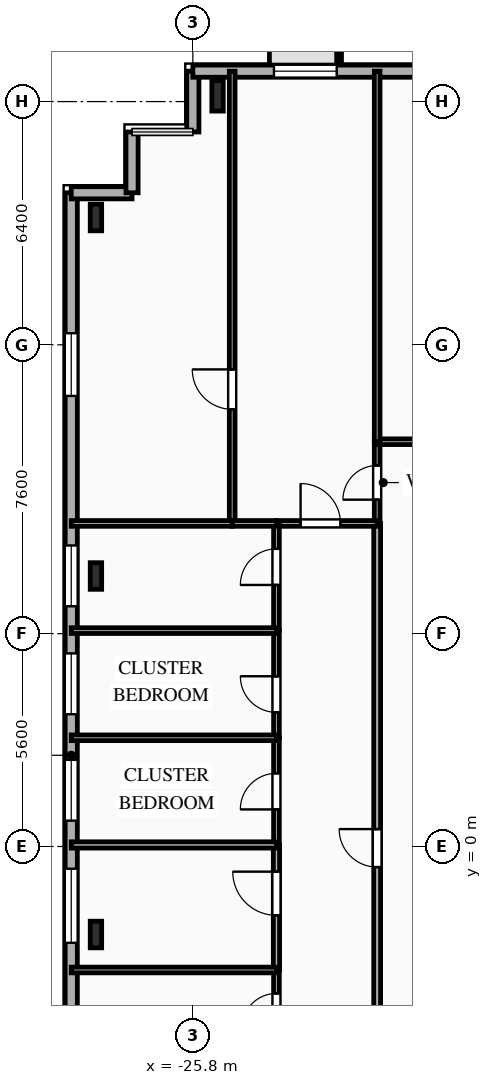
"""IFC4 building model, lengths in metres.
Left out: names, types, materials, properties, quantities, classifications, styles, units other than length and angle.
Written with IfcOpenShell. Run it as: python <this file> out.ifc"""

import sys

from ifc_helpers import new_model, si_unit, direction, frame, frame_2d, origin, origin_2d, place, context, subcontext, project, spatial, rectangle, i_section, extrude, element, fill, save


model = new_model("IFC4")
c1 = context("Model", 3, precision=1e-05, world=origin(), true_north=direction((0.0, 1.0)))
c2 = subcontext(c1, "Body", "Model", "MODEL_VIEW")
j1 = project(units=[si_unit("LENGTHUNIT", "METRE"), si_unit("PLANEANGLEUNIT", "RADIAN")], contexts=[c1])
p1 = place(None, origin())
s1 = spatial("IfcSite", under=j1, at=p1, CompositionType="ELEMENT")
p2 = place(p1, origin())
s2 = spatial("IfcBuilding", under=s1, at=p2, CompositionType="ELEMENT")
p3 = place(p2, frame((0.0, 0.0, 134.35)))
s3 = spatial("IfcBuildingStorey", under=s2, at=p3, CompositionType="ELEMENT", Elevation=134.35)
p4 = place(p3, frame((-25.15, 19.75, 0.0), z_axis=(0.0, 0.0, 1.0), x_axis=(1.0, 0.0, 0.0)))
e1 = element("IfcColumn", 1, at=p4, inside=s3, PredefinedType="COLUMN", context=c2, shape_type="SweptSolid", body=[
    extrude(i_section(OverallWidth=0.3, OverallDepth=0.8, WebThickness=0.018, FlangeThickness=0.033, FilletRadius=0.03, at=origin_2d()), origin(), (0.0, 0.0, 1.0), 3.35),
])
for number, where, z_axis, x_axis in (
    (2, (-28.35, 16.55, 0.0), (0.0, 0.0, 1.0), (1.0, 0.0, 0.0)),
    (3, (-28.35, 7.117, 0.0), (0.0, 0.0, 1.0), (1.0, 0.0, 0.0)),
    (4, (-28.35, -2.317, 0.0), (0.0, 0.0, 1.0), (1.0, 0.0, 0.0)),
):
    element("IfcColumn", number, at=place(p3, frame(where, z_axis=z_axis, x_axis=x_axis)), inside=s3, PredefinedType="COLUMN", context=c2, shape_type="SweptSolid", body=[
        extrude(i_section(OverallWidth=0.3, OverallDepth=0.7, WebThickness=0.017, FlangeThickness=0.032, FilletRadius=0.027, at=origin_2d()), origin(), (0.0, 0.0, 1.0), 3.35),
    ])
p5 = place(p3, frame((-29.0, -12.4, 0.0), z_axis=(0.0, 0.0, 1.0), x_axis=(0.0, 1.0, 0.0)))
e5 = element("IfcWall", 5, at=p5, inside=s3, PredefinedType="SOLIDWALL", context=c2, shape_type="SweptSolid", body=[
    extrude(rectangle(XDim=29.6, YDim=0.32, at=frame_2d((14.8, 0.0))), origin(), (0.0, 0.0, 1.0), 3.04),
])
p6 = place(p5, frame((2.855, 0.0, 0.85)))
e6 = element("IfcOpeningElement", 6, at=p6, cuts=e5, PredefinedType="OPENING", context=c2, shape_type="SweptSolid", body=[
    extrude(rectangle(XDim=1.65, YDim=1.85, at=frame_2d((0.825, 0.925))), frame((0.0, 0.17, 0.0), z_axis=(0.0, -1.0, 0.0), x_axis=(1.0, 0.0, 0.0)), (0.0, 0.0, 1.0), 0.34),
])
p7 = place(p5, frame((9.865, 0.0, 0.85)))
e7 = element("IfcOpeningElement", 7, at=p7, cuts=e5, PredefinedType="OPENING", context=c2, shape_type="SweptSolid", body=[
    extrude(rectangle(XDim=1.95, YDim=1.85, at=frame_2d((0.975, 0.925))), frame((0.0, 0.17, 0.0), z_axis=(0.0, -1.0, 0.0), x_axis=(1.0, 0.0, 0.0)), (0.0, 0.0, 1.0), 0.34),
])
p8 = place(p5, frame((13.08, 0.0, 0.85)))
e8 = element("IfcOpeningElement", 8, at=p8, cuts=e5, PredefinedType="OPENING", context=c2, shape_type="SweptSolid", body=[
    extrude(rectangle(XDim=1.6, YDim=1.85, at=frame_2d((0.8, 0.925))), frame((0.0, 0.17, 0.0), z_axis=(0.0, -1.0, 0.0), x_axis=(1.0, 0.0, 0.0)), (0.0, 0.0, 1.0), 0.34),
])
p9 = place(p5, frame((15.88, 0.0, 0.85)))
e9 = element("IfcOpeningElement", 9, at=p9, cuts=e5, PredefinedType="OPENING", context=c2, shape_type="SweptSolid", body=[
    extrude(rectangle(XDim=1.6, YDim=1.85, at=frame_2d((0.8, 0.925))), frame((0.0, 0.17, 0.0), z_axis=(0.0, -1.0, 0.0), x_axis=(1.0, 0.0, 0.0)), (0.0, 0.0, 1.0), 0.34),
])
p10 = place(p5, frame((18.72, 0.0, 0.85)))
e10 = element("IfcOpeningElement", 10, at=p10, cuts=e5, PredefinedType="OPENING", context=c2, shape_type="SweptSolid", body=[
    extrude(rectangle(XDim=1.6, YDim=1.85, at=frame_2d((0.8, 0.925))), frame((0.0, 0.17, 0.0), z_axis=(0.0, -1.0, 0.0), x_axis=(1.0, 0.0, 0.0)), (0.0, 0.0, 1.0), 0.34),
])
p11 = place(p5, frame((24.255, 0.0, 0.85)))
e11 = element("IfcOpeningElement", 11, at=p11, cuts=e5, PredefinedType="OPENING", context=c2, shape_type="SweptSolid", body=[
    extrude(rectangle(XDim=1.65, YDim=1.85, at=frame_2d((0.825, 0.925))), frame((0.0, 0.17, 0.0), z_axis=(0.0, -1.0, 0.0), x_axis=(1.0, 0.0, 0.0)), (0.0, 0.0, 1.0), 0.34),
])
for number, where, z_axis, x_axis in (
    (12, (-29.0, 17.2, 0.0), (0.0, 0.0, 1.0), (1.0, 0.0, 0.0)),
    (13, (-27.4, 17.2, 0.0), (0.0, 0.0, 1.0), (0.0, 1.0, 0.0)),
):
    element("IfcWall", number, at=place(p3, frame(where, z_axis=z_axis, x_axis=x_axis)), inside=s3, PredefinedType="SOLIDWALL", context=c2, shape_type="SweptSolid", body=[
        extrude(rectangle(XDim=1.6, YDim=0.32, at=frame_2d((0.8, 0.0))), origin(), (0.0, 0.0, 1.0), 3.04),
    ])
p12 = place(p3, frame((-25.8, 18.8, 0.0), z_axis=(0.0, 0.0, 1.0), x_axis=(0.0, 1.0, 0.0)))
e14 = element("IfcWall", 14, at=p12, inside=s3, PredefinedType="SOLIDWALL", context=c2, shape_type="SweptSolid", body=[
    extrude(rectangle(XDim=1.6, YDim=0.32, at=frame_2d((0.8, 0.0))), origin(), (0.0, 0.0, 1.0), 3.04),
])
p13 = place(p3, frame((-25.8, 20.4, 0.0), z_axis=(0.0, 0.0, 1.0), x_axis=(1.0, 0.0, 0.0)))
e15 = element("IfcWall", 15, at=p13, inside=s3, PredefinedType="SOLIDWALL", context=c2, shape_type="SweptSolid", body=[
    extrude(rectangle(XDim=49.6, YDim=0.32, at=frame_2d((24.8, 0.0))), origin(), (0.0, 0.0, 1.0), 3.04),
])
p14 = place(p13, frame((2.135, 0.0, 0.85)))
e16 = element("IfcOpeningElement", 16, at=p14, cuts=e15, PredefinedType="OPENING", context=c2, shape_type="SweptSolid", body=[
    extrude(rectangle(XDim=1.65, YDim=1.85, at=frame_2d((0.825, 0.925))), frame((0.0, 0.17, 0.0), z_axis=(0.0, -1.0, 0.0), x_axis=(1.0, 0.0, 0.0)), (0.0, 0.0, 1.0), 0.34),
])
p15 = place(p13, frame((6.706, 0.0, 0.85)))
e17 = element("IfcOpeningElement", 17, at=p15, cuts=e15, PredefinedType="OPENING", context=c2, shape_type="SweptSolid", body=[
    extrude(rectangle(XDim=1.65, YDim=1.85, at=frame_2d((0.825, 0.925))), frame((0.0, 0.17, 0.0), z_axis=(0.0, -1.0, 0.0), x_axis=(1.0, 0.0, 0.0)), (0.0, 0.0, 1.0), 0.34),
])
p16 = place(p13, frame((14.76, 0.0, 0.85)))
e18 = element("IfcOpeningElement", 18, at=p16, cuts=e15, PredefinedType="OPENING", context=c2, shape_type="SweptSolid", body=[
    extrude(rectangle(XDim=1.6, YDim=1.85, at=frame_2d((0.8, 0.925))), frame((0.0, 0.17, 0.0), z_axis=(0.0, -1.0, 0.0), x_axis=(1.0, 0.0, 0.0)), (0.0, 0.0, 1.0), 0.34),
])
p17 = place(p13, frame((19.26, 0.0, 0.85)))
e19 = element("IfcOpeningElement", 19, at=p17, cuts=e15, PredefinedType="OPENING", context=c2, shape_type="SweptSolid", body=[
    extrude(rectangle(XDim=2.2, YDim=1.85, at=frame_2d((1.1, 0.925))), frame((0.0, 0.17, 0.0), z_axis=(0.0, -1.0, 0.0), x_axis=(1.0, 0.0, 0.0)), (0.0, 0.0, 1.0), 0.34),
])
p18 = place(p13, frame((25.26, 0.0, 0.85)))
e20 = element("IfcOpeningElement", 20, at=p18, cuts=e15, PredefinedType="OPENING", context=c2, shape_type="SweptSolid", body=[
    extrude(rectangle(XDim=2.2, YDim=1.85, at=frame_2d((1.1, 0.925))), frame((0.0, 0.17, 0.0), z_axis=(0.0, -1.0, 0.0), x_axis=(1.0, 0.0, 0.0)), (0.0, 0.0, 1.0), 0.34),
])
p19 = place(p13, frame((30.4, 0.0, 0.85)))
e21 = element("IfcOpeningElement", 21, at=p19, cuts=e15, PredefinedType="OPENING", context=c2, shape_type="SweptSolid", body=[
    extrude(rectangle(XDim=2.2, YDim=1.85, at=frame_2d((1.1, 0.925))), frame((0.0, 0.17, 0.0), z_axis=(0.0, -1.0, 0.0), x_axis=(1.0, 0.0, 0.0)), (0.0, 0.0, 1.0), 0.34),
])
p20 = place(p13, frame((37.18, 0.0, 0.85)))
e22 = element("IfcOpeningElement", 22, at=p20, cuts=e15, PredefinedType="OPENING", context=c2, shape_type="SweptSolid", body=[
    extrude(rectangle(XDim=2.2, YDim=1.85, at=frame_2d((1.1, 0.925))), frame((0.0, 0.17, 0.0), z_axis=(0.0, -1.0, 0.0), x_axis=(1.0, 0.0, 0.0)), (0.0, 0.0, 1.0), 0.34),
])
p21 = place(p13, frame((43.215, 0.0, 0.85)))
e23 = element("IfcOpeningElement", 23, at=p21, cuts=e15, PredefinedType="OPENING", context=c2, shape_type="SweptSolid", body=[
    extrude(rectangle(XDim=1.65, YDim=1.85, at=frame_2d((0.825, 0.925))), frame((0.0, 0.17, 0.0), z_axis=(0.0, -1.0, 0.0), x_axis=(1.0, 0.0, 0.0)), (0.0, 0.0, 1.0), 0.34),
])
p22 = place(p13, frame((47.45, 0.0, 0.85)))
e24 = element("IfcOpeningElement", 24, at=p22, cuts=e15, PredefinedType="OPENING", context=c2, shape_type="SweptSolid", body=[
    extrude(rectangle(XDim=1.1, YDim=1.85, at=frame_2d((0.55, 0.925))), frame((0.0, 0.17, 0.0), z_axis=(0.0, -1.0, 0.0), x_axis=(1.0, 0.0, 0.0)), (0.0, 0.0, 1.0), 0.34),
])
p23 = place(p3, frame((-20.95, 8.5, 0.0), z_axis=(0.0, 0.0, 1.0), x_axis=(0.0, 1.0, 0.0)))
e25 = element("IfcWall", 25, at=p23, inside=s3, PredefinedType="PARTITIONING", context=c2, shape_type="SweptSolid", body=[
    extrude(rectangle(XDim=2.15, YDim=0.15, at=frame_2d((1.075, 0.0))), origin(), (0.0, 0.0, 1.0), 3.04),
])
p24 = place(p23, frame((0.625, 0.0, 0.0)))
e26 = element("IfcOpeningElement", 26, at=p24, cuts=e25, PredefinedType="OPENING", context=c2, shape_type="SweptSolid", body=[
    extrude(rectangle(XDim=0.9, YDim=2.1, at=frame_2d((0.45, 1.05))), frame((0.0, 0.085, 0.0), z_axis=(0.0, -1.0, 0.0), x_axis=(1.0, 0.0, 0.0)), (0.0, 0.0, 1.0), 0.17),
])
p25 = place(p3, frame((-20.95, 10.65, 0.0), z_axis=(0.0, 0.0, 1.0), x_axis=(1.0, 0.0, 0.0)))
e27 = element("IfcWall", 27, at=p25, inside=s3, PredefinedType="PARTITIONING", context=c2, shape_type="SweptSolid", body=[
    extrude(rectangle(XDim=6.486, YDim=0.15, at=frame_2d((3.243, 0.0))), origin(), (0.0, 0.0, 1.0), 3.04),
])
p26 = place(p25, frame((4.322, 0.0, 0.0)))
e28 = element("IfcOpeningElement", 28, at=p26, cuts=e27, PredefinedType="OPENING", context=c2, shape_type="SweptSolid", body=[
    extrude(rectangle(XDim=1.05, YDim=2.15, at=frame_2d((0.525, 1.075))), frame((0.0, 0.085, 0.0), z_axis=(0.0, -1.0, 0.0), x_axis=(1.0, 0.0, 0.0)), (0.0, 0.0, 1.0), 0.17),
])
p27 = place(p3, frame((-20.95, -5.6, 0.0), z_axis=(0.0, 0.0, 1.0), x_axis=(0.0, 1.0, 0.0)))
e29 = element("IfcWall", 29, at=p27, inside=s3, PredefinedType="PARTITIONING", context=c2, shape_type="SweptSolid", body=[
    extrude(rectangle(XDim=14.1, YDim=0.18, at=frame_2d((7.05, 0.0))), origin(), (0.0, 0.0, 1.0), 3.04),
])
p28 = place(p27, frame((5.058, 0.0, 0.0)))
e30 = element("IfcOpeningElement", 30, at=p28, cuts=e29, PredefinedType="OPENING", context=c2, shape_type="SweptSolid", body=[
    extrude(rectangle(XDim=1.0, YDim=2.15, at=frame_2d((0.5, 1.075))), frame((0.0, 0.1, 0.0), z_axis=(0.0, -1.0, 0.0), x_axis=(1.0, 0.0, 0.0)), (0.0, 0.0, 1.0), 0.2),
])
p29 = place(p3, frame((-23.6, 8.5, 0.0), z_axis=(0.0, 0.0, 1.0), x_axis=(1.0, 0.0, 0.0)))
e31 = element("IfcWall", 31, at=p29, inside=s3, PredefinedType="PARTITIONING", context=c2, shape_type="SweptSolid", body=[
    extrude(rectangle(XDim=2.65, YDim=0.15, at=frame_2d((1.325, 0.0))), origin(), (0.0, 0.0, 1.0), 3.04),
])
p30 = place(p29, frame((0.635, 0.0, 0.0)))
e32 = element("IfcOpeningElement", 32, at=p30, cuts=e31, PredefinedType="OPENING", context=c2, shape_type="SweptSolid", body=[
    extrude(rectangle(XDim=1.05, YDim=2.15, at=frame_2d((0.525, 1.075))), frame((0.0, 0.085, 0.0), z_axis=(0.0, -1.0, 0.0), x_axis=(1.0, 0.0, 0.0)), (0.0, 0.0, 1.0), 0.17),
])
p31 = place(p3, frame((-23.6, -5.6, 0.0), z_axis=(0.0, 0.0, 1.0), x_axis=(0.0, 1.0, 0.0)))
e33 = element("IfcWall", 33, at=p31, inside=s3, PredefinedType="PLUMBINGWALL", context=c2, shape_type="SweptSolid", body=[
    extrude(rectangle(XDim=2.35, YDim=0.15, at=frame_2d((1.175, 0.0))), origin(), (0.0, 0.0, 1.0), 2.695),
])
p32 = place(p31, frame((0.834, 0.0, 0.0)))
e34 = element("IfcOpeningElement", 34, at=p32, cuts=e33, PredefinedType="OPENING", context=c2, shape_type="SweptSolid", body=[
    extrude(rectangle(XDim=0.9, YDim=2.1, at=frame_2d((0.45, 1.05))), frame((0.0, 0.085, 0.0), z_axis=(0.0, -1.0, 0.0), x_axis=(1.0, 0.0, 0.0)), (0.0, 0.0, 1.0), 0.17),
])
p33 = place(p3, frame((-23.6, -3.25, 0.0), z_axis=(0.0, 0.0, 1.0), x_axis=(0.0, 1.0, 0.0)))
e35 = element("IfcWall", 35, at=p33, inside=s3, PredefinedType="PARTITIONING", context=c2, shape_type="SweptSolid", body=[
    extrude(rectangle(XDim=3.29, YDim=0.165, at=frame_2d((1.645, 0.0))), origin(), (0.0, 0.0, 1.0), 2.695),
])
p34 = place(p33, frame((1.438, 0.0, 0.0)))
e36 = element("IfcOpeningElement", 36, at=p34, cuts=e35, PredefinedType="OPENING", context=c2, shape_type="SweptSolid", body=[
    extrude(rectangle(XDim=1.15, YDim=2.15, at=frame_2d((0.575, 1.075))), frame((0.0, 0.093, 0.0), z_axis=(0.0, -1.0, 0.0), x_axis=(1.0, 0.0, 0.0)), (0.0, 0.0, 1.0), 0.185),
])
p35 = place(p3, frame((-23.6, 0.04, 0.0), z_axis=(0.0, 0.0, 1.0), x_axis=(0.0, 1.0, 0.0)))
e37 = element("IfcWall", 37, at=p35, inside=s3, PredefinedType="PARTITIONING", context=c2, shape_type="SweptSolid", body=[
    extrude(rectangle(XDim=2.82, YDim=0.15, at=frame_2d((1.41, 0.0))), origin(), (0.0, 0.0, 1.0), 2.695),
])
p36 = place(p35, frame((0.935, 0.0, 0.0)))
e38 = element("IfcOpeningElement", 38, at=p36, cuts=e37, PredefinedType="OPENING", context=c2, shape_type="SweptSolid", body=[
    extrude(rectangle(XDim=0.95, YDim=2.1, at=frame_2d((0.475, 1.05))), frame((0.0, 0.085, 0.0), z_axis=(0.0, -1.0, 0.0), x_axis=(1.0, 0.0, 0.0)), (0.0, 0.0, 1.0), 0.17),
])
p37 = place(p3, frame((-23.6, 2.86, 0.0), z_axis=(0.0, 0.0, 1.0), x_axis=(0.0, 1.0, 0.0)))
e39 = element("IfcWall", 39, at=p37, inside=s3, PredefinedType="PARTITIONING", context=c2, shape_type="SweptSolid", body=[
    extrude(rectangle(XDim=2.82, YDim=0.15, at=frame_2d((1.41, 0.0))), origin(), (0.0, 0.0, 1.0), 2.695),
])
p38 = place(p37, frame((0.669, 0.0, 0.0)))
e40 = element("IfcOpeningElement", 40, at=p38, cuts=e39, PredefinedType="OPENING", context=c2, shape_type="SweptSolid", body=[
    extrude(rectangle(XDim=0.95, YDim=2.1, at=frame_2d((0.475, 1.05))), frame((0.0, 0.085, 0.0), z_axis=(0.0, -1.0, 0.0), x_axis=(1.0, 0.0, 0.0)), (0.0, 0.0, 1.0), 0.17),
])
p39 = place(p3, frame((-23.6, 5.68, 0.0), z_axis=(0.0, 0.0, 1.0), x_axis=(0.0, 1.0, 0.0)))
e41 = element("IfcWall", 41, at=p39, inside=s3, PredefinedType="PARTITIONING", context=c2, shape_type="SweptSolid", body=[
    extrude(rectangle(XDim=2.82, YDim=0.15, at=frame_2d((1.41, 0.0))), origin(), (0.0, 0.0, 1.0), 2.695),
])
p40 = place(p39, frame((1.201, 0.0, 0.0)))
e42 = element("IfcOpeningElement", 42, at=p40, cuts=e41, PredefinedType="OPENING", context=c2, shape_type="SweptSolid", body=[
    extrude(rectangle(XDim=0.95, YDim=2.1, at=frame_2d((0.475, 1.05))), frame((0.0, 0.085, 0.0), z_axis=(0.0, -1.0, 0.0), x_axis=(1.0, 0.0, 0.0)), (0.0, 0.0, 1.0), 0.17),
])
p41 = place(p3, frame((-24.765, 8.5, 0.0), z_axis=(0.0, 0.0, 1.0), x_axis=(0.0, 1.0, 0.0)))
e43 = element("IfcWall", 43, at=p41, inside=s3, PredefinedType="PARTITIONING", context=c2, shape_type="SweptSolid", body=[
    extrude(rectangle(XDim=11.9, YDim=0.15, at=frame_2d((5.95, 0.0))), origin(), (0.0, 0.0, 1.0), 3.04),
])
p42 = place(p41, frame((3.002, 0.0, 0.0)))
e44 = element("IfcOpeningElement", 44, at=p42, cuts=e43, PredefinedType="OPENING", context=c2, shape_type="SweptSolid", body=[
    extrude(rectangle(XDim=1.05, YDim=2.15, at=frame_2d((0.525, 1.075))), frame((0.0, 0.085, 0.0), z_axis=(0.0, -1.0, 0.0), x_axis=(1.0, 0.0, 0.0)), (0.0, 0.0, 1.0), 0.17),
])
p43 = place(p3, frame((-23.6, 8.5, 0.0), z_axis=(0.0, 0.0, 1.0), x_axis=(-1.0, 0.0, 0.0)))
e45 = element("IfcWall", 45, at=p43, inside=s3, PredefinedType="PARTITIONING", context=c2, shape_type="SweptSolid", body=[
    extrude(rectangle(XDim=1.165, YDim=0.15, at=frame_2d((0.583, 0.0))), origin(), (0.0, 0.0, 1.0), 3.04),
])
p44 = place(p3, frame((-20.95, 20.4, 0.0), z_axis=(0.0, 0.0, 1.0), x_axis=(0.0, -1.0, 0.0)))
e46 = element("IfcWall", 46, at=p44, inside=s3, PredefinedType="PARTITIONING", context=c2, shape_type="SweptSolid", body=[
    extrude(rectangle(XDim=9.75, YDim=0.15, at=frame_2d((4.875, 0.0))), origin(), (0.0, 0.0, 1.0), 3.04),
])
p45 = place(p3, frame((-24.765, 8.5, 0.0), z_axis=(0.0, 0.0, 1.0), x_axis=(-1.0, 0.0, 0.0)))
e47 = element("IfcWall", 47, at=p45, inside=s3, PredefinedType="PARTITIONING", context=c2, shape_type="SweptSolid", body=[
    extrude(rectangle(XDim=4.235, YDim=0.15, at=frame_2d((2.118, 0.0))), origin(), (0.0, 0.0, 1.0), 3.04),
])
p46 = place(p3, frame((-29.0, -3.25, 0.0), z_axis=(0.0, 0.0, 1.0), x_axis=(1.0, 0.0, 0.0)))
e48 = element("IfcWall", 48, at=p46, inside=s3, PredefinedType="PLUMBINGWALL", context=c2, shape_type="SweptSolid", body=[
    extrude(rectangle(XDim=5.4, YDim=0.15, at=frame_2d((2.7, 0.0))), origin(), (0.0, 0.0, 1.0), 3.04),
])
p47 = place(p3, frame((-29.0, 0.04, 0.0), z_axis=(0.0, 0.0, 1.0), x_axis=(1.0, 0.0, 0.0)))
e49 = element("IfcWall", 49, at=p47, inside=s3, PredefinedType="PARTITIONING", context=c2, shape_type="SweptSolid", body=[
    extrude(rectangle(XDim=5.4, YDim=0.165, at=frame_2d((2.7, 0.0))), origin(), (0.0, 0.0, 1.0), 3.04),
])
for number, where, z_axis, x_axis in (
    (50, (-29.0, 2.86, 0.0), (0.0, 0.0, 1.0), (1.0, 0.0, 0.0)),
    (51, (-29.0, 5.68, 0.0), (0.0, 0.0, 1.0), (1.0, 0.0, 0.0)),
):
    element("IfcWall", number, at=place(p3, frame(where, z_axis=z_axis, x_axis=x_axis)), inside=s3, PredefinedType="PARTITIONING", context=c2, shape_type="SweptSolid", body=[
        extrude(rectangle(XDim=5.4, YDim=0.15, at=frame_2d((2.7, 0.0))), origin(), (0.0, 0.0, 1.0), 3.04),
    ])
p48 = place(p7, origin())
e52 = element("IfcWindow", 52, at=p48, inside=s3, PartitioningType="SINGLE_PANEL", PredefinedType="WINDOW", context=c2, shape_type="SweptSolid", body=[
    extrude(rectangle(XDim=1.95, YDim=1.85, at=frame_2d((0.975, 0.925))), frame((0.0, 0.03, 0.0), z_axis=(0.0, -1.0, 0.0), x_axis=(1.0, 0.0, 0.0)), (0.0, 0.0, 1.0), 0.06),
])
fill(e7, e52)
p49 = place(p8, origin())
e53 = element("IfcWindow", 53, at=p49, inside=s3, PartitioningType="SINGLE_PANEL", PredefinedType="WINDOW", context=c2, shape_type="SweptSolid", body=[
    extrude(rectangle(XDim=1.6, YDim=1.85, at=frame_2d((0.8, 0.925))), frame((0.0, 0.03, 0.0), z_axis=(0.0, -1.0, 0.0), x_axis=(1.0, 0.0, 0.0)), (0.0, 0.0, 1.0), 0.06),
])
fill(e8, e53)
p50 = place(p9, origin())
e54 = element("IfcWindow", 54, at=p50, inside=s3, PartitioningType="SINGLE_PANEL", PredefinedType="WINDOW", context=c2, shape_type="SweptSolid", body=[
    extrude(rectangle(XDim=1.6, YDim=1.85, at=frame_2d((0.8, 0.925))), frame((0.0, 0.03, 0.0), z_axis=(0.0, -1.0, 0.0), x_axis=(1.0, 0.0, 0.0)), (0.0, 0.0, 1.0), 0.06),
])
fill(e9, e54)
p51 = place(p10, origin())
e55 = element("IfcWindow", 55, at=p51, inside=s3, PartitioningType="SINGLE_PANEL", PredefinedType="WINDOW", context=c2, shape_type="SweptSolid", body=[
    extrude(rectangle(XDim=1.6, YDim=1.85, at=frame_2d((0.8, 0.925))), frame((0.0, 0.03, 0.0), z_axis=(0.0, -1.0, 0.0), x_axis=(1.0, 0.0, 0.0)), (0.0, 0.0, 1.0), 0.06),
])
fill(e10, e55)
p52 = place(p11, origin())
e56 = element("IfcWindow", 56, at=p52, inside=s3, PartitioningType="SINGLE_PANEL", PredefinedType="WINDOW", context=c2, shape_type="SweptSolid", body=[
    extrude(rectangle(XDim=1.65, YDim=1.85, at=frame_2d((0.825, 0.925))), frame((0.0, 0.03, 0.0), z_axis=(0.0, -1.0, 0.0), x_axis=(1.0, 0.0, 0.0)), (0.0, 0.0, 1.0), 0.06),
])
fill(e11, e56)
p53 = place(p14, origin())
e57 = element("IfcWindow", 57, at=p53, inside=s3, PartitioningType="SINGLE_PANEL", PredefinedType="WINDOW", context=c2, shape_type="SweptSolid", body=[
    extrude(rectangle(XDim=1.65, YDim=1.85, at=frame_2d((0.825, 0.925))), frame((0.0, 0.03, 0.0), z_axis=(0.0, -1.0, 0.0), x_axis=(1.0, 0.0, 0.0)), (0.0, 0.0, 1.0), 0.06),
])
fill(e16, e57)
p54 = place(p24, origin())
e58 = element("IfcDoor", 58, at=p54, inside=s3, OperationType="SINGLE_SWING_LEFT", PredefinedType="DOOR", context=c2, shape_type="SweptSolid", body=[
    extrude(rectangle(XDim=0.9, YDim=2.1, at=frame_2d((0.45, 1.05))), frame((0.0, 0.025, 0.0), z_axis=(0.0, -1.0, 0.0), x_axis=(1.0, 0.0, 0.0)), (0.0, 0.0, 1.0), 0.05),
])
fill(e26, e58)
p55 = place(p28, origin())
e59 = element("IfcDoor", 59, at=p55, inside=s3, OperationType="SINGLE_SWING_RIGHT", PredefinedType="DOOR", context=c2, shape_type="SweptSolid", body=[
    extrude(rectangle(XDim=1.0, YDim=2.15, at=frame_2d((0.5, 1.075))), frame((0.0, 0.025, 0.0), z_axis=(0.0, -1.0, 0.0), x_axis=(1.0, 0.0, 0.0)), (0.0, 0.0, 1.0), 0.05),
])
fill(e30, e59)
p56 = place(p30, origin())
e60 = element("IfcDoor", 60, at=p56, inside=s3, OperationType="SINGLE_SWING_LEFT", PredefinedType="DOOR", context=c2, shape_type="SweptSolid", body=[
    extrude(rectangle(XDim=1.05, YDim=2.15, at=frame_2d((0.525, 1.075))), frame((0.0, 0.025, 0.0), z_axis=(0.0, -1.0, 0.0), x_axis=(1.0, 0.0, 0.0)), (0.0, 0.0, 1.0), 0.05),
])
fill(e32, e60)
p57 = place(p32, origin())
e61 = element("IfcDoor", 61, at=p57, inside=s3, OperationType="SINGLE_SWING_LEFT", PredefinedType="DOOR", context=c2, shape_type="SweptSolid", body=[
    extrude(rectangle(XDim=0.9, YDim=2.1, at=frame_2d((0.45, 1.05))), frame((0.0, 0.025, 0.0), z_axis=(0.0, -1.0, 0.0), x_axis=(1.0, 0.0, 0.0)), (0.0, 0.0, 1.0), 0.05),
])
fill(e34, e61)
p58 = place(p34, origin())
e62 = element("IfcDoor", 62, at=p58, inside=s3, OperationType="SINGLE_SWING_RIGHT", PredefinedType="DOOR", context=c2, shape_type="SweptSolid", body=[
    extrude(rectangle(XDim=1.15, YDim=2.15, at=frame_2d((0.575, 1.075))), frame((0.0, 0.025, 0.0), z_axis=(0.0, -1.0, 0.0), x_axis=(1.0, 0.0, 0.0)), (0.0, 0.0, 1.0), 0.05),
])
fill(e36, e62)
p59 = place(p36, origin())
e63 = element("IfcDoor", 63, at=p59, inside=s3, OperationType="SINGLE_SWING_LEFT", PredefinedType="DOOR", context=c2, shape_type="SweptSolid", body=[
    extrude(rectangle(XDim=0.95, YDim=2.1, at=frame_2d((0.475, 1.05))), frame((0.0, 0.025, 0.0), z_axis=(0.0, -1.0, 0.0), x_axis=(1.0, 0.0, 0.0)), (0.0, 0.0, 1.0), 0.05),
])
fill(e38, e63)
p60 = place(p38, origin())
e64 = element("IfcDoor", 64, at=p60, inside=s3, OperationType="SINGLE_SWING_RIGHT", PredefinedType="DOOR", context=c2, shape_type="SweptSolid", body=[
    extrude(rectangle(XDim=0.95, YDim=2.1, at=frame_2d((0.475, 1.05))), frame((0.0, 0.025, 0.0), z_axis=(0.0, -1.0, 0.0), x_axis=(1.0, 0.0, 0.0)), (0.0, 0.0, 1.0), 0.05),
])
fill(e40, e64)
p61 = place(p40, origin())
e65 = element("IfcDoor", 65, at=p61, inside=s3, OperationType="SINGLE_SWING_LEFT", PredefinedType="DOOR", context=c2, shape_type="SweptSolid", body=[
    extrude(rectangle(XDim=0.95, YDim=2.1, at=frame_2d((0.475, 1.05))), frame((0.0, 0.025, 0.0), z_axis=(0.0, -1.0, 0.0), x_axis=(1.0, 0.0, 0.0)), (0.0, 0.0, 1.0), 0.05),
])
fill(e42, e65)
p62 = place(p42, origin())
e66 = element("IfcDoor", 66, at=p62, inside=s3, OperationType="SINGLE_SWING_RIGHT", PredefinedType="DOOR", context=c2, shape_type="SweptSolid", body=[
    extrude(rectangle(XDim=1.05, YDim=2.15, at=frame_2d((0.525, 1.075))), frame((0.0, 0.025, 0.0), z_axis=(0.0, -1.0, 0.0), x_axis=(1.0, 0.0, 0.0)), (0.0, 0.0, 1.0), 0.05),
])
fill(e44, e66)
save(model, sys.argv[1])
